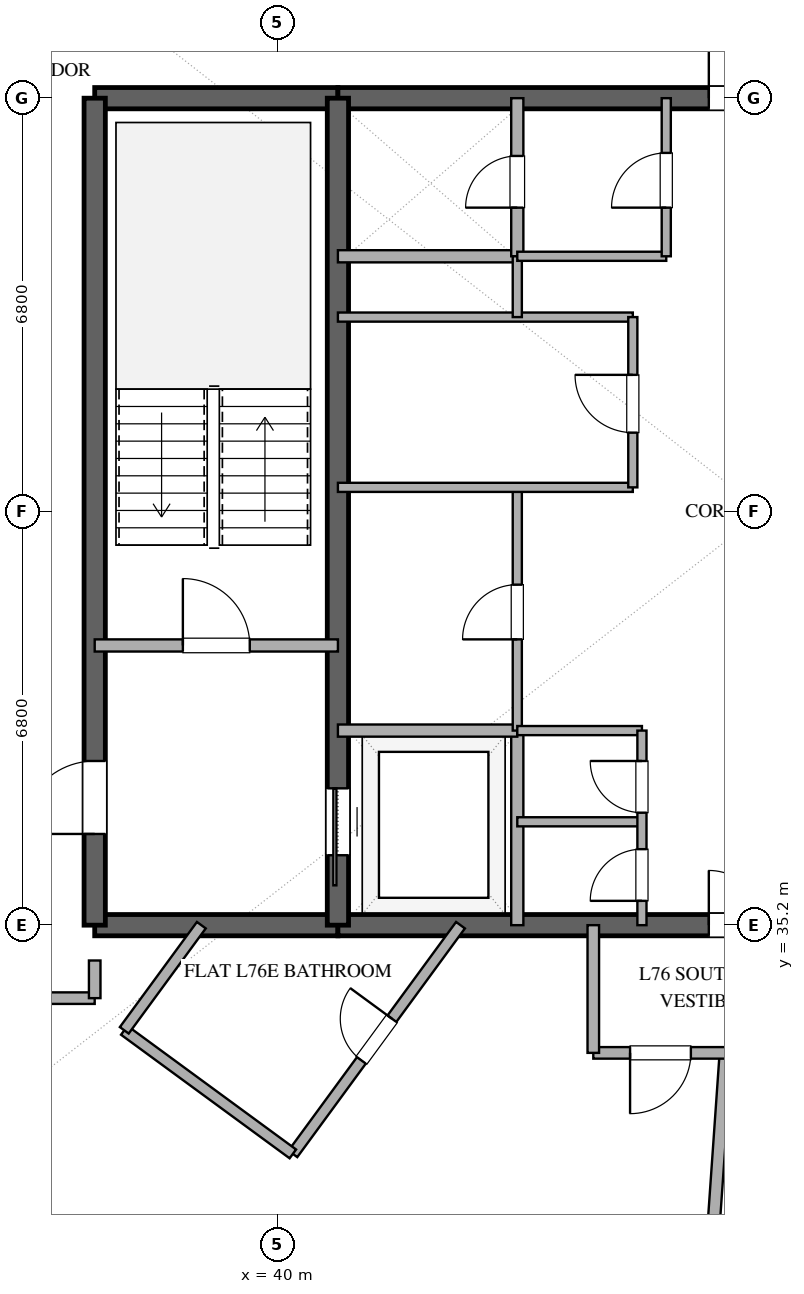
"""IFC4 building model, lengths in metres.
Left out: names, types, materials, properties, quantities, classifications, styles, units other than length and angle.
Written with IfcOpenShell. Run it as: python <this file> out.ifc"""

import sys

from ifc_helpers import new_model, si_unit, direction, frame, frame_2d, origin, place, context, subcontext, project, spatial, rectangle, extrude, element, fill, save


model = new_model("IFC4")
c1 = context("Model", 3, precision=1e-05, world=origin(), true_north=direction((0.0, 1.0)))
c2 = subcontext(c1, "Body", "Model", "MODEL_VIEW")
j1 = project(units=[si_unit("LENGTHUNIT", "METRE"), si_unit("PLANEANGLEUNIT", "RADIAN")], contexts=[c1])
p1 = place(None, origin())
s1 = spatial("IfcSite", under=j1, at=p1, CompositionType="ELEMENT")
p2 = place(p1, origin())
s2 = spatial("IfcBuilding", under=s1, at=p2, CompositionType="ELEMENT")
p3 = place(p2, frame((0.0, 0.0, 294.6)))
s3 = spatial("IfcBuildingStorey", under=s2, at=p3, CompositionType="ELEMENT", Elevation=294.6)
p4 = place(p3, frame((37.0, 35.2, 0.0), z_axis=(0.0, 0.0, 1.0), x_axis=(1.0, 0.0, 0.0)))
e1 = element("IfcWall", 1, at=p4, inside=s3, PredefinedType="SHEAR", context=c2, shape_type="SweptSolid", body=[
    extrude(rectangle(XDim=4.0, YDim=0.35, at=frame_2d((2.0, 0.0))), origin(), (0.0, 0.0, 1.0), 3.37),
])
p5 = place(p3, frame((41.0, 35.2, 0.0), z_axis=(0.0, 0.0, 1.0), x_axis=(1.0, 0.0, 0.0)))
e2 = element("IfcWall", 2, at=p5, inside=s3, PredefinedType="SHEAR", context=c2, shape_type="SweptSolid", body=[
    extrude(rectangle(XDim=14.0, YDim=0.35, at=frame_2d((7.0, 0.0))), origin(), (0.0, 0.0, 1.0), 3.37),
])
p6 = place(p5, frame((6.1, 0.0, 0.0)))
e3 = element("IfcOpeningElement", 3, at=p6, cuts=e2, PredefinedType="OPENING", context=c2, shape_type="SweptSolid", body=[
    extrude(rectangle(XDim=1.8, YDim=2.25, at=frame_2d((0.9, 1.125))), frame((0.0, 0.185, 0.0), z_axis=(0.0, -1.0, 0.0), x_axis=(1.0, 0.0, 0.0)), (0.0, 0.0, 1.0), 0.37),
])
p7 = place(p3, frame((37.0, 48.8, 0.0), z_axis=(0.0, 0.0, 1.0), x_axis=(1.0, 0.0, 0.0)))
e4 = element("IfcWall", 4, at=p7, inside=s3, PredefinedType="SHEAR", context=c2, shape_type="SweptSolid", body=[
    extrude(rectangle(XDim=4.0, YDim=0.35, at=frame_2d((2.0, 0.0))), origin(), (0.0, 0.0, 1.0), 3.37),
])
p8 = place(p3, frame((41.0, 48.8, 0.0), z_axis=(0.0, 0.0, 1.0), x_axis=(1.0, 0.0, 0.0)))
e5 = element("IfcWall", 5, at=p8, inside=s3, PredefinedType="SHEAR", context=c2, shape_type="SweptSolid", body=[
    extrude(rectangle(XDim=14.0, YDim=0.35, at=frame_2d((7.0, 0.0))), origin(), (0.0, 0.0, 1.0), 3.37),
])
p9 = place(p8, frame((6.1, 0.0, 0.0)))
e6 = element("IfcOpeningElement", 6, at=p9, cuts=e5, PredefinedType="OPENING", context=c2, shape_type="SweptSolid", body=[
    extrude(rectangle(XDim=1.8, YDim=2.25, at=frame_2d((0.9, 1.125))), frame((0.0, 0.185, 0.0), z_axis=(0.0, -1.0, 0.0), x_axis=(1.0, 0.0, 0.0)), (0.0, 0.0, 1.0), 0.37),
])
p10 = place(p3, frame((37.0, 35.2, 0.0), z_axis=(0.0, 0.0, 1.0), x_axis=(0.0, 1.0, 0.0)))
e7 = element("IfcWall", 7, at=p10, inside=s3, PredefinedType="SHEAR", context=c2, shape_type="SweptSolid", body=[
    extrude(rectangle(XDim=13.6, YDim=0.35, at=frame_2d((6.8, 0.0))), origin(), (0.0, 0.0, 1.0), 3.37),
])
p11 = place(p10, frame((1.5, 0.0, 0.0)))
e8 = element("IfcOpeningElement", 8, at=p11, cuts=e7, PredefinedType="OPENING", context=c2, shape_type="SweptSolid", body=[
    extrude(rectangle(XDim=1.2, YDim=2.15, at=frame_2d((0.6, 1.075))), frame((0.0, 0.185, 0.0), z_axis=(0.0, -1.0, 0.0), x_axis=(1.0, 0.0, 0.0)), (0.0, 0.0, 1.0), 0.37),
])
p12 = place(p3, frame((41.0, 35.2, 0.0), z_axis=(0.0, 0.0, 1.0), x_axis=(0.0, 1.0, 0.0)))
e9 = element("IfcWall", 9, at=p12, inside=s3, PredefinedType="SHEAR", context=c2, shape_type="SweptSolid", body=[
    extrude(rectangle(XDim=13.6, YDim=0.35, at=frame_2d((6.8, 0.0))), origin(), (0.0, 0.0, 1.0), 3.37),
])
p13 = place(p12, frame((1.15, 0.0, 0.0)))
e10 = element("IfcOpeningElement", 10, at=p13, cuts=e9, PredefinedType="OPENING", context=c2, shape_type="SweptSolid", body=[
    extrude(rectangle(XDim=1.1, YDim=2.2, at=frame_2d((0.55, 1.1))), frame((0.0, 0.185, 0.0), z_axis=(0.0, -1.0, 0.0), x_axis=(1.0, 0.0, 0.0)), (0.0, 0.0, 1.0), 0.37),
])
p14 = place(p3, frame((37.0, 39.8, 0.0), z_axis=(0.0, 0.0, 1.0), x_axis=(1.0, 0.0, 0.0)))
e11 = element("IfcWall", 11, at=p14, inside=s3, PredefinedType="SOLIDWALL", context=c2, shape_type="SweptSolid", body=[
    extrude(rectangle(XDim=4.0, YDim=0.2, at=frame_2d((2.0, 0.0))), origin(), (0.0, 0.0, 1.0), 2.73),
])
p15 = place(p14, frame((1.45, 0.0, 0.0)))
e12 = element("IfcOpeningElement", 12, at=p15, cuts=e11, PredefinedType="OPENING", context=c2, shape_type="SweptSolid", body=[
    extrude(rectangle(XDim=1.1, YDim=2.15, at=frame_2d((0.55, 1.075))), frame((0.0, 0.11, 0.0), z_axis=(0.0, -1.0, 0.0), x_axis=(1.0, 0.0, 0.0)), (0.0, 0.0, 1.0), 0.22),
])
p16 = place(p3, frame((43.95, 35.2, 0.0), z_axis=(0.0, 0.0, 1.0), x_axis=(0.0, 1.0, 0.0)))
e13 = element("IfcWall", 13, at=p16, inside=s3, PredefinedType="SOLIDWALL", context=c2, shape_type="SweptSolid", body=[
    extrude(rectangle(XDim=3.2, YDim=0.2, at=frame_2d((1.6, 0.0))), origin(), (0.0, 0.0, 1.0), 2.73),
])
for number, where, z_axis, x_axis in (
    (14, (41.0, 38.4, 0.0), (0.0, 0.0, 1.0), (1.0, 0.0, 0.0)),
    (15, (41.0, 46.2, 0.0), (0.0, 0.0, 1.0), (1.0, 0.0, 0.0)),
):
    element("IfcWall", number, at=place(p3, frame(where, z_axis=z_axis, x_axis=x_axis)), inside=s3, PredefinedType="SOLIDWALL", context=c2, shape_type="SweptSolid", body=[
        extrude(rectangle(XDim=2.95, YDim=0.2, at=frame_2d((1.475, 0.0))), origin(), (0.0, 0.0, 1.0), 2.73),
    ])
p17 = place(p3, frame((43.95, 46.2, 0.0), z_axis=(0.0, 0.0, 1.0), x_axis=(0.0, 1.0, 0.0)))
e16 = element("IfcWall", 16, at=p17, inside=s3, PredefinedType="SOLIDWALL", context=c2, shape_type="SweptSolid", body=[
    extrude(rectangle(XDim=2.6, YDim=0.2, at=frame_2d((1.3, 0.0))), origin(), (0.0, 0.0, 1.0), 2.73),
])
p18 = place(p17, frame((0.8, 0.0, 0.0)))
e17 = element("IfcOpeningElement", 17, at=p18, cuts=e16, PredefinedType="OPENING", context=c2, shape_type="SweptSolid", body=[
    extrude(rectangle(XDim=0.85, YDim=2.15, at=frame_2d((0.425, 1.075))), frame((0.0, 0.11, 0.0), z_axis=(0.0, -1.0, 0.0), x_axis=(1.0, 0.0, 0.0)), (0.0, 0.0, 1.0), 0.22),
])
p19 = place(p3, frame((43.95, 38.4, 0.0), z_axis=(0.0, 0.0, 1.0), x_axis=(0.0, 1.0, 0.0)))
e18 = element("IfcWall", 18, at=p19, inside=s3, PredefinedType="PARTITIONING", context=c2, shape_type="SweptSolid", body=[
    extrude(rectangle(XDim=4.0, YDim=0.15, at=frame_2d((2.0, 0.0))), origin(), (0.0, 0.0, 1.0), 2.73),
])
p20 = place(p19, frame((1.5, 0.0, 0.0)))
e19 = element("IfcOpeningElement", 19, at=p20, cuts=e18, PredefinedType="OPENING", context=c2, shape_type="SweptSolid", body=[
    extrude(rectangle(XDim=0.9, YDim=2.15, at=frame_2d((0.45, 1.075))), frame((0.0, 0.085, 0.0), z_axis=(0.0, -1.0, 0.0), x_axis=(1.0, 0.0, 0.0)), (0.0, 0.0, 1.0), 0.17),
])
for number, where, z_axis, x_axis in (
    (20, (41.0, 42.4, 0.0), (0.0, 0.0, 1.0), (1.0, 0.0, 0.0)),
    (21, (41.0, 45.2, 0.0), (0.0, 0.0, 1.0), (1.0, 0.0, 0.0)),
):
    element("IfcWall", number, at=place(p3, frame(where, z_axis=z_axis, x_axis=x_axis)), inside=s3, PredefinedType="PARTITIONING", context=c2, shape_type="SweptSolid", body=[
        extrude(rectangle(XDim=4.85, YDim=0.15, at=frame_2d((2.425, 0.0))), origin(), (0.0, 0.0, 1.0), 2.73),
    ])
p21 = place(p3, frame((43.95, 45.2, 0.0), z_axis=(0.0, 0.0, 1.0), x_axis=(0.0, 1.0, 0.0)))
e22 = element("IfcWall", 22, at=p21, inside=s3, PredefinedType="PARTITIONING", context=c2, shape_type="SweptSolid", body=[
    extrude(rectangle(XDim=1.0, YDim=0.15, at=frame_2d((0.5, 0.0))), origin(), (0.0, 0.0, 1.0), 2.73),
])
p22 = place(p3, frame((45.85, 42.4, 0.0), z_axis=(0.0, 0.0, 1.0), x_axis=(0.0, 1.0, 0.0)))
e23 = element("IfcWall", 23, at=p22, inside=s3, PredefinedType="PARTITIONING", context=c2, shape_type="SweptSolid", body=[
    extrude(rectangle(XDim=2.8, YDim=0.15, at=frame_2d((1.4, 0.0))), origin(), (0.0, 0.0, 1.0), 2.73),
])
p23 = place(p22, frame((0.9, 0.0, 0.0)))
e24 = element("IfcOpeningElement", 24, at=p23, cuts=e23, PredefinedType="OPENING", context=c2, shape_type="SweptSolid", body=[
    extrude(rectangle(XDim=0.95, YDim=2.15, at=frame_2d((0.475, 1.075))), frame((0.0, 0.085, 0.0), z_axis=(0.0, -1.0, 0.0), x_axis=(1.0, 0.0, 0.0)), (0.0, 0.0, 1.0), 0.17),
])
for number, where, z_axis, x_axis in (
    (25, (43.95, 36.9, 0.0), (0.0, 0.0, 1.0), (1.0, 0.0, 0.0)),
    (26, (43.95, 38.4, 0.0), (0.0, 0.0, 1.0), (1.0, 0.0, 0.0)),
):
    element("IfcWall", number, at=place(p3, frame(where, z_axis=z_axis, x_axis=x_axis)), inside=s3, PredefinedType="PARTITIONING", context=c2, shape_type="SweptSolid", body=[
        extrude(rectangle(XDim=2.05, YDim=0.15, at=frame_2d((1.025, 0.0))), origin(), (0.0, 0.0, 1.0), 2.73),
    ])
p24 = place(p3, frame((46.0, 35.2, 0.0), z_axis=(0.0, 0.0, 1.0), x_axis=(0.0, 1.0, 0.0)))
e27 = element("IfcWall", 27, at=p24, inside=s3, PredefinedType="PARTITIONING", context=c2, shape_type="SweptSolid", body=[
    extrude(rectangle(XDim=3.2, YDim=0.15, at=frame_2d((1.6, 0.0))), origin(), (0.0, 0.0, 1.0), 2.73),
])
p25 = place(p24, frame((0.4, 0.0, 0.0)))
e28 = element("IfcOpeningElement", 28, at=p25, cuts=e27, PredefinedType="OPENING", context=c2, shape_type="SweptSolid", body=[
    extrude(rectangle(XDim=0.85, YDim=2.15, at=frame_2d((0.425, 1.075))), frame((0.0, 0.085, 0.0), z_axis=(0.0, -1.0, 0.0), x_axis=(1.0, 0.0, 0.0)), (0.0, 0.0, 1.0), 0.17),
])
p26 = place(p24, frame((1.85, 0.0, 0.0)))
e29 = element("IfcOpeningElement", 29, at=p26, cuts=e27, PredefinedType="OPENING", context=c2, shape_type="SweptSolid", body=[
    extrude(rectangle(XDim=0.85, YDim=2.15, at=frame_2d((0.425, 1.075))), frame((0.0, 0.085, 0.0), z_axis=(0.0, -1.0, 0.0), x_axis=(1.0, 0.0, 0.0)), (0.0, 0.0, 1.0), 0.17),
])
p27 = place(p3, frame((43.95, 46.2, 0.0), z_axis=(0.0, 0.0, 1.0), x_axis=(1.0, 0.0, 0.0)))
e30 = element("IfcWall", 30, at=p27, inside=s3, PredefinedType="PARTITIONING", context=c2, shape_type="SweptSolid", body=[
    extrude(rectangle(XDim=2.45, YDim=0.15, at=frame_2d((1.225, 0.0))), origin(), (0.0, 0.0, 1.0), 2.73),
])
p28 = place(p3, frame((46.4, 46.2, 0.0), z_axis=(0.0, 0.0, 1.0), x_axis=(0.0, 1.0, 0.0)))
e31 = element("IfcWall", 31, at=p28, inside=s3, PredefinedType="PARTITIONING", context=c2, shape_type="SweptSolid", body=[
    extrude(rectangle(XDim=2.6, YDim=0.15, at=frame_2d((1.3, 0.0))), origin(), (0.0, 0.0, 1.0), 2.73),
])
p29 = place(p28, frame((0.8, 0.0, 0.0)))
e32 = element("IfcOpeningElement", 32, at=p29, cuts=e31, PredefinedType="OPENING", context=c2, shape_type="SweptSolid", body=[
    extrude(rectangle(XDim=0.9, YDim=2.15, at=frame_2d((0.45, 1.075))), frame((0.0, 0.085, 0.0), z_axis=(0.0, -1.0, 0.0), x_axis=(1.0, 0.0, 0.0)), (0.0, 0.0, 1.0), 0.17),
])
p30 = place(p3, frame((47.378, 33.1, 0.0), z_axis=(0.0, 0.0, 1.0), x_axis=(-0.069765360577, -0.997563428792, 0.0)))
e33 = element("IfcWall", 33, at=p30, inside=s3, PredefinedType="PARTITIONING", context=c2, shape_type="SweptSolid", body=[
    extrude(rectangle(XDim=10.82, YDim=0.2, at=frame_2d((5.41, 0.0))), origin(), (0.0, 0.0, 1.0), 2.73),
])
p31 = place(p3, frame((37.63, 27.852, 0.0), z_axis=(0.0, 0.0, 1.0), x_axis=(-0.896847493932, 0.442339883605, 0.0)))
e34 = element("IfcWall", 34, at=p31, inside=s3, PredefinedType="PLUMBINGWALL", context=c2, shape_type="SweptSolid", body=[
    extrude(rectangle(XDim=5.959, YDim=0.16, at=frame_2d((2.979, 0.0))), origin(), (0.0, 0.0, 1.0), 2.73),
])
p32 = place(p31, frame((2.53, 0.0, 0.0)))
e35 = element("IfcOpeningElement", 35, at=p32, cuts=e34, PredefinedType="OPENING", context=c2, shape_type="SweptSolid", body=[
    extrude(rectangle(XDim=0.9, YDim=2.1, at=frame_2d((0.45, 1.05))), frame((0.0, 0.09, 0.0), z_axis=(0.0, -1.0, 0.0), x_axis=(1.0, 0.0, 0.0)), (0.0, 0.0, 1.0), 0.18),
])
p33 = place(p3, frame((40.259, 31.439, 0.0), z_axis=(0.0, 0.0, 1.0), x_axis=(0.591168457908, 0.806548110391, 0.0)))
e36 = element("IfcWall", 36, at=p33, inside=s3, PredefinedType="PLUMBINGWALL", context=c2, shape_type="SweptSolid", body=[
    extrude(rectangle(XDim=4.663, YDim=0.18, at=frame_2d((2.332, 0.0))), origin(), (0.0, 0.0, 1.0), 2.73),
])
p34 = place(p33, frame((1.907, 0.0, 0.0)))
e37 = element("IfcOpeningElement", 37, at=p34, cuts=e36, PredefinedType="OPENING", context=c2, shape_type="SweptSolid", body=[
    extrude(rectangle(XDim=0.85, YDim=2.1, at=frame_2d((0.425, 1.05))), frame((0.0, 0.1, 0.0), z_axis=(0.0, -1.0, 0.0), x_axis=(1.0, 0.0, 0.0)), (0.0, 0.0, 1.0), 0.2),
])
p35 = place(p3, frame((50.8, 33.1, 0.0), z_axis=(0.0, 0.0, 1.0), x_axis=(-1.0, 0.0, 0.0)))
e38 = element("IfcWall", 38, at=p35, inside=s3, PredefinedType="PARTITIONING", context=c2, shape_type="SweptSolid", body=[
    extrude(rectangle(XDim=5.6, YDim=0.19, at=frame_2d((2.8, 0.0))), origin(), (0.0, 0.0, 1.0), 2.73),
])
p36 = place(p35, frame((1.227, 0.0, 0.0)))
e39 = element("IfcOpeningElement", 39, at=p36, cuts=e38, PredefinedType="OPENING", context=c2, shape_type="SweptSolid", body=[
    extrude(rectangle(XDim=1.0, YDim=2.2, at=frame_2d((0.5, 1.1))), frame((0.0, 0.105, 0.0), z_axis=(0.0, -1.0, 0.0), x_axis=(1.0, 0.0, 0.0)), (0.0, 0.0, 1.0), 0.21),
])
p37 = place(p35, frame((3.995, 0.0, 0.0)))
e40 = element("IfcOpeningElement", 40, at=p37, cuts=e38, PredefinedType="OPENING", context=c2, shape_type="SweptSolid", body=[
    extrude(rectangle(XDim=1.0, YDim=2.2, at=frame_2d((0.5, 1.1))), frame((0.0, 0.105, 0.0), z_axis=(0.0, -1.0, 0.0), x_axis=(1.0, 0.0, 0.0)), (0.0, 0.0, 1.0), 0.21),
])
p38 = place(p3, frame((37.486, 33.471, 0.0), z_axis=(0.0, 0.0, 1.0), x_axis=(0.80655624282, -0.59115736244, 0.0)))
e41 = element("IfcWall", 41, at=p38, inside=s3, PredefinedType="PLUMBINGWALL", context=c2, shape_type="SweptSolid", body=[
    extrude(rectangle(XDim=3.438, YDim=0.18, at=frame_2d((1.719, 0.0))), origin(), (0.0, 0.0, 1.0), 2.73),
])
p39 = place(p3, frame((38.754, 35.2, 0.0), z_axis=(0.0, 0.0, 1.0), x_axis=(-0.591255046212, -0.806484637379, 0.0)))
e42 = element("IfcWall", 42, at=p39, inside=s3, PredefinedType="PLUMBINGWALL", context=c2, shape_type="SweptSolid", body=[
    extrude(rectangle(XDim=2.144, YDim=0.18, at=frame_2d((1.072, 0.0))), origin(), (0.0, 0.0, 1.0), 2.73),
])
p40 = place(p3, frame((45.2, 33.1, 0.0), z_axis=(0.0, 0.0, 1.0), x_axis=(0.0, 1.0, 0.0)))
e43 = element("IfcWall", 43, at=p40, inside=s3, PredefinedType="PARTITIONING", context=c2, shape_type="SweptSolid", body=[
    extrude(rectangle(XDim=2.1, YDim=0.19, at=frame_2d((1.05, 0.0))), origin(), (0.0, 0.0, 1.0), 2.73),
])
p41 = place(p3, frame((37.0, 34.0, 0.0), z_axis=(0.0, 0.0, 1.0), x_axis=(-1.0, 0.0, 0.0)))
e44 = element("IfcWall", 44, at=p41, inside=s3, PredefinedType="PARTITIONING", context=c2, shape_type="SweptSolid", body=[
    extrude(rectangle(XDim=2.2, YDim=0.19, at=frame_2d((1.1, 0.0))), origin(), (0.0, 0.0, 1.0), 2.73),
])
p42 = place(p3, frame((37.0, 34.619, 0.0), z_axis=(0.0, 0.0, 1.0), x_axis=(0.0, -1.0, 0.0)))
e45 = element("IfcWall", 45, at=p42, inside=s3, PredefinedType="PARTITIONING", context=c2, shape_type="SweptSolid", body=[
    extrude(rectangle(XDim=0.619, YDim=0.19, at=frame_2d((0.31, 0.0))), origin(), (0.0, 0.0, 1.0), 2.73),
])
p43 = place(p13, origin())
e46 = element("IfcDoor", 46, at=p43, inside=s3, OperationType="SLIDING_TO_LEFT", PredefinedType="DOOR", context=c2, shape_type="SweptSolid", body=[
    extrude(rectangle(XDim=1.1, YDim=2.2, at=frame_2d((0.55, 1.1))), frame((0.0, 0.025, 0.0), z_axis=(0.0, -1.0, 0.0), x_axis=(1.0, 0.0, 0.0)), (0.0, 0.0, 1.0), 0.05),
])
fill(e10, e46)
p44 = place(p11, origin())
e47 = element("IfcDoor", 47, at=p44, inside=s3, OperationType="SINGLE_SWING_LEFT", PredefinedType="DOOR", context=c2, shape_type="SweptSolid", body=[
    extrude(rectangle(XDim=1.2, YDim=2.15, at=frame_2d((0.6, 1.075))), frame((0.0, 0.025, 0.0), z_axis=(0.0, -1.0, 0.0), x_axis=(1.0, 0.0, 0.0)), (0.0, 0.0, 1.0), 0.05),
])
fill(e8, e47)
p45 = place(p6, origin())
e48 = element("IfcDoor", 48, at=p45, inside=s3, OperationType="DOUBLE_DOOR_SINGLE_SWING", PredefinedType="DOOR", context=c2, shape_type="SweptSolid", body=[
    extrude(rectangle(XDim=1.8, YDim=2.25, at=frame_2d((0.9, 1.125))), frame((0.0, 0.025, 0.0), z_axis=(0.0, -1.0, 0.0), x_axis=(1.0, 0.0, 0.0)), (0.0, 0.0, 1.0), 0.05),
])
fill(e3, e48)
p46 = place(p9, origin())
e49 = element("IfcDoor", 49, at=p46, inside=s3, OperationType="DOUBLE_DOOR_SINGLE_SWING", PredefinedType="DOOR", context=c2, shape_type="SweptSolid", body=[
    extrude(rectangle(XDim=1.8, YDim=2.25, at=frame_2d((0.9, 1.125))), frame((0.0, 0.025, 0.0), z_axis=(0.0, -1.0, 0.0), x_axis=(1.0, 0.0, 0.0)), (0.0, 0.0, 1.0), 0.05),
])
fill(e6, e49)
p47 = place(p15, origin())
e50 = element("IfcDoor", 50, at=p47, inside=s3, OperationType="SINGLE_SWING_LEFT", PredefinedType="DOOR", context=c2, shape_type="SweptSolid", body=[
    extrude(rectangle(XDim=1.1, YDim=2.15, at=frame_2d((0.55, 1.075))), frame((0.0, 0.025, 0.0), z_axis=(0.0, -1.0, 0.0), x_axis=(1.0, 0.0, 0.0)), (0.0, 0.0, 1.0), 0.05),
])
fill(e12, e50)
p48 = place(p18, origin())
e51 = element("IfcDoor", 51, at=p48, inside=s3, OperationType="SINGLE_SWING_LEFT", PredefinedType="DOOR", context=c2, shape_type="SweptSolid", body=[
    extrude(rectangle(XDim=0.85, YDim=2.15, at=frame_2d((0.425, 1.075))), frame((0.0, 0.025, 0.0), z_axis=(0.0, -1.0, 0.0), x_axis=(1.0, 0.0, 0.0)), (0.0, 0.0, 1.0), 0.05),
])
fill(e17, e51)
p49 = place(p20, origin())
e52 = element("IfcDoor", 52, at=p49, inside=s3, OperationType="SINGLE_SWING_LEFT", PredefinedType="DOOR", context=c2, shape_type="SweptSolid", body=[
    extrude(rectangle(XDim=0.9, YDim=2.15, at=frame_2d((0.45, 1.075))), frame((0.0, 0.025, 0.0), z_axis=(0.0, -1.0, 0.0), x_axis=(1.0, 0.0, 0.0)), (0.0, 0.0, 1.0), 0.05),
])
fill(e19, e52)
p50 = place(p23, origin())
e53 = element("IfcDoor", 53, at=p50, inside=s3, OperationType="SINGLE_SWING_RIGHT", PredefinedType="DOOR", context=c2, shape_type="SweptSolid", body=[
    extrude(rectangle(XDim=0.95, YDim=2.15, at=frame_2d((0.475, 1.075))), frame((0.0, 0.025, 0.0), z_axis=(0.0, -1.0, 0.0), x_axis=(1.0, 0.0, 0.0)), (0.0, 0.0, 1.0), 0.05),
])
fill(e24, e53)
p51 = place(p25, origin())
e54 = element("IfcDoor", 54, at=p51, inside=s3, OperationType="SINGLE_SWING_LEFT", PredefinedType="DOOR", context=c2, shape_type="SweptSolid", body=[
    extrude(rectangle(XDim=0.85, YDim=2.15, at=frame_2d((0.425, 1.075))), frame((0.0, 0.025, 0.0), z_axis=(0.0, -1.0, 0.0), x_axis=(1.0, 0.0, 0.0)), (0.0, 0.0, 1.0), 0.05),
])
fill(e28, e54)
p52 = place(p26, origin())
e55 = element("IfcDoor", 55, at=p52, inside=s3, OperationType="SINGLE_SWING_RIGHT", PredefinedType="DOOR", context=c2, shape_type="SweptSolid", body=[
    extrude(rectangle(XDim=0.85, YDim=2.15, at=frame_2d((0.425, 1.075))), frame((0.0, 0.025, 0.0), z_axis=(0.0, -1.0, 0.0), x_axis=(1.0, 0.0, 0.0)), (0.0, 0.0, 1.0), 0.05),
])
fill(e29, e55)
p53 = place(p29, origin())
e56 = element("IfcDoor", 56, at=p53, inside=s3, OperationType="SINGLE_SWING_LEFT", PredefinedType="DOOR", context=c2, shape_type="SweptSolid", body=[
    extrude(rectangle(XDim=0.9, YDim=2.15, at=frame_2d((0.45, 1.075))), frame((0.0, 0.025, 0.0), z_axis=(0.0, -1.0, 0.0), x_axis=(1.0, 0.0, 0.0)), (0.0, 0.0, 1.0), 0.05),
])
fill(e32, e56)
p54 = place(p34, origin())
e57 = element("IfcDoor", 57, at=p54, inside=s3, OperationType="SINGLE_SWING_RIGHT", PredefinedType="DOOR", context=c2, shape_type="SweptSolid", body=[
    extrude(rectangle(XDim=0.85, YDim=2.1, at=frame_2d((0.425, 1.05))), frame((0.0, 0.025, 0.0), z_axis=(0.0, -1.0, 0.0), x_axis=(1.0, 0.0, 0.0)), (0.0, 0.0, 1.0), 0.05),
])
fill(e37, e57)
p55 = place(p37, origin())
e58 = element("IfcDoor", 58, at=p55, inside=s3, OperationType="SINGLE_SWING_RIGHT", PredefinedType="DOOR", context=c2, shape_type="SweptSolid", body=[
    extrude(rectangle(XDim=1.0, YDim=2.2, at=frame_2d((0.5, 1.1))), frame((0.0, 0.025, 0.0), z_axis=(0.0, -1.0, 0.0), x_axis=(1.0, 0.0, 0.0)), (0.0, 0.0, 1.0), 0.05),
])
fill(e40, e58)
save(model, sys.argv[1])
